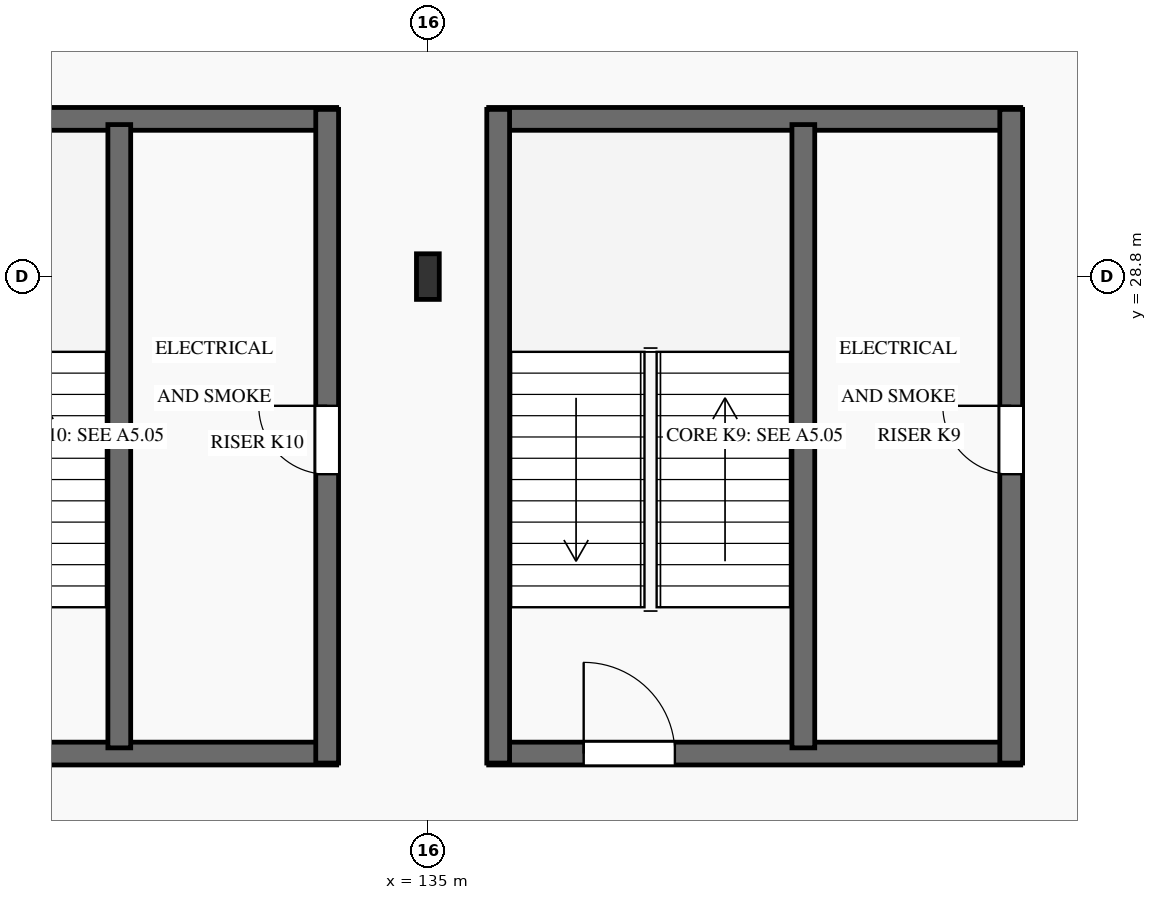
"""IFC4 building model, lengths in metres.
Left out: names, types, materials, properties, quantities, classifications, styles, units other than length and angle.
Written with IfcOpenShell. Run it as: python <this file> out.ifc"""

import sys

from ifc_helpers import new_model, si_unit, direction, frame, frame_2d, origin, origin_2d, place, context, subcontext, project, spatial, rectangle, i_section, extrude, element, fill, save


model = new_model("IFC4")
c1 = context("Model", 3, precision=1e-05, world=origin(), true_north=direction((0.0, 1.0)))
c2 = subcontext(c1, "Body", "Model", "MODEL_VIEW")
j1 = project(units=[si_unit("LENGTHUNIT", "METRE"), si_unit("PLANEANGLEUNIT", "RADIAN")], contexts=[c1])
p1 = place(None, origin())
s1 = spatial("IfcSite", under=j1, at=p1, CompositionType="ELEMENT")
p2 = place(p1, origin())
s2 = spatial("IfcBuilding", under=s1, at=p2, CompositionType="ELEMENT")
p3 = place(p2, frame((0.0, 0.0, -4.5)))
s3 = spatial("IfcBuildingStorey", under=s2, at=p3, CompositionType="ELEMENT", Elevation=-4.5)
p4 = place(p3, frame((135.0, 28.8, 0.0), z_axis=(0.0, 0.0, 1.0), x_axis=(1.0, 0.0, 0.0)))
e1 = element("IfcColumn", 1, at=p4, inside=s3, PredefinedType="COLUMN", context=c2, shape_type="SweptSolid", body=[
    extrude(i_section(OverallWidth=0.3, OverallDepth=0.6, WebThickness=0.015, FlangeThickness=0.03, FilletRadius=0.027, at=origin_2d()), origin(), (0.0, 0.0, 1.0), 4.5),
])
p5 = place(p3, frame((135.8, 22.525, 0.0), z_axis=(0.0, 0.0, 1.0), x_axis=(1.0, 0.0, 0.0)))
e2 = element("IfcWall", 2, at=p5, inside=s3, PredefinedType="SHEAR", context=c2, shape_type="SweptSolid", body=[
    extrude(rectangle(XDim=7.0, YDim=0.3, at=frame_2d((3.5, 0.0))), origin(), (0.0, 0.0, 1.0), 4.5),
])
p6 = place(p5, frame((1.25, 0.0, 0.0)))
e3 = element("IfcOpeningElement", 3, at=p6, cuts=e2, PredefinedType="OPENING", context=c2, shape_type="SweptSolid", body=[
    extrude(rectangle(XDim=1.2, YDim=2.15, at=frame_2d((0.6, 1.075))), frame((0.0, 0.165, 0.0), z_axis=(0.0, -1.0, 0.0), x_axis=(1.0, 0.0, 0.0)), (0.0, 0.0, 1.0), 0.33),
])
p7 = place(p3, frame((135.8, 30.875, 0.0), z_axis=(0.0, 0.0, 1.0), x_axis=(1.0, 0.0, 0.0)))
e4 = element("IfcWall", 4, at=p7, inside=s3, PredefinedType="SHEAR", context=c2, shape_type="SweptSolid", body=[
    extrude(rectangle(XDim=7.0, YDim=0.3, at=frame_2d((3.5, 0.0))), origin(), (0.0, 0.0, 1.0), 4.5),
])
p8 = place(p3, frame((135.925, 22.4, 0.0), z_axis=(0.0, 0.0, 1.0), x_axis=(0.0, 1.0, 0.0)))
e5 = element("IfcWall", 5, at=p8, inside=s3, PredefinedType="SHEAR", context=c2, shape_type="SweptSolid", body=[
    extrude(rectangle(XDim=8.6, YDim=0.3, at=frame_2d((4.3, 0.0))), origin(), (0.0, 0.0, 1.0), 4.5),
])
p9 = place(p3, frame((142.675, 22.4, 0.0), z_axis=(0.0, 0.0, 1.0), x_axis=(0.0, 1.0, 0.0)))
e6 = element("IfcWall", 6, at=p9, inside=s3, PredefinedType="SHEAR", context=c2, shape_type="SweptSolid", body=[
    extrude(rectangle(XDim=8.6, YDim=0.3, at=frame_2d((4.3, 0.0))), origin(), (0.0, 0.0, 1.0), 4.5),
])
p10 = place(p9, frame((3.8, 0.0, 0.0)))
e7 = element("IfcOpeningElement", 7, at=p10, cuts=e6, PredefinedType="OPENING", context=c2, shape_type="SweptSolid", body=[
    extrude(rectangle(XDim=0.9, YDim=2.05, at=frame_2d((0.45, 1.025))), frame((0.0, 0.165, 0.0), z_axis=(0.0, -1.0, 0.0), x_axis=(1.0, 0.0, 0.0)), (0.0, 0.0, 1.0), 0.33),
])
p11 = place(p3, frame((139.94, 22.6, 0.0), z_axis=(0.0, 0.0, 1.0), x_axis=(0.0, 1.0, 0.0)))
e8 = element("IfcWall", 8, at=p11, inside=s3, PredefinedType="SHEAR", context=c2, shape_type="SweptSolid", body=[
    extrude(rectangle(XDim=8.2, YDim=0.3, at=frame_2d((4.1, 0.0))), origin(), (0.0, 0.0, 1.0), 4.5),
])
p12 = place(p3, frame((126.8, 22.525, 0.0), z_axis=(0.0, 0.0, 1.0), x_axis=(1.0, 0.0, 0.0)))
e9 = element("IfcWall", 9, at=p12, inside=s3, PredefinedType="SHEAR", context=c2, shape_type="SweptSolid", body=[
    extrude(rectangle(XDim=7.0, YDim=0.3, at=frame_2d((3.5, 0.0))), origin(), (0.0, 0.0, 1.0), 4.5),
])
p13 = place(p12, frame((1.25, 0.0, 0.0)))
e10 = element("IfcOpeningElement", 10, at=p13, cuts=e9, PredefinedType="OPENING", context=c2, shape_type="SweptSolid", body=[
    extrude(rectangle(XDim=1.2, YDim=2.15, at=frame_2d((0.6, 1.075))), frame((0.0, 0.165, 0.0), z_axis=(0.0, -1.0, 0.0), x_axis=(1.0, 0.0, 0.0)), (0.0, 0.0, 1.0), 0.33),
])
p14 = place(p3, frame((126.8, 30.875, 0.0), z_axis=(0.0, 0.0, 1.0), x_axis=(1.0, 0.0, 0.0)))
e11 = element("IfcWall", 11, at=p14, inside=s3, PredefinedType="SHEAR", context=c2, shape_type="SweptSolid", body=[
    extrude(rectangle(XDim=7.0, YDim=0.3, at=frame_2d((3.5, 0.0))), origin(), (0.0, 0.0, 1.0), 4.5),
])
p15 = place(p3, frame((133.675, 22.4, 0.0), z_axis=(0.0, 0.0, 1.0), x_axis=(0.0, 1.0, 0.0)))
e12 = element("IfcWall", 12, at=p15, inside=s3, PredefinedType="SHEAR", context=c2, shape_type="SweptSolid", body=[
    extrude(rectangle(XDim=8.6, YDim=0.3, at=frame_2d((4.3, 0.0))), origin(), (0.0, 0.0, 1.0), 4.5),
])
p16 = place(p15, frame((3.8, 0.0, 0.0)))
e13 = element("IfcOpeningElement", 13, at=p16, cuts=e12, PredefinedType="OPENING", context=c2, shape_type="SweptSolid", body=[
    extrude(rectangle(XDim=0.9, YDim=2.05, at=frame_2d((0.45, 1.025))), frame((0.0, 0.165, 0.0), z_axis=(0.0, -1.0, 0.0), x_axis=(1.0, 0.0, 0.0)), (0.0, 0.0, 1.0), 0.33),
])
p17 = place(p3, frame((130.94, 22.6, 0.0), z_axis=(0.0, 0.0, 1.0), x_axis=(0.0, 1.0, 0.0)))
e14 = element("IfcWall", 14, at=p17, inside=s3, PredefinedType="SHEAR", context=c2, shape_type="SweptSolid", body=[
    extrude(rectangle(XDim=8.2, YDim=0.3, at=frame_2d((4.1, 0.0))), origin(), (0.0, 0.0, 1.0), 4.5),
])
p18 = place(p6, origin())
e15 = element("IfcDoor", 15, at=p18, inside=s3, OperationType="SINGLE_SWING_LEFT", PredefinedType="DOOR", context=c2, shape_type="SweptSolid", body=[
    extrude(rectangle(XDim=1.2, YDim=2.15, at=frame_2d((0.6, 1.075))), frame((0.0, 0.025, 0.0), z_axis=(0.0, -1.0, 0.0), x_axis=(1.0, 0.0, 0.0)), (0.0, 0.0, 1.0), 0.05),
])
fill(e3, e15)
p19 = place(p10, origin())
e16 = element("IfcDoor", 16, at=p19, inside=s3, OperationType="SINGLE_SWING_RIGHT", PredefinedType="DOOR", context=c2, shape_type="SweptSolid", body=[
    extrude(rectangle(XDim=0.9, YDim=2.05, at=frame_2d((0.45, 1.025))), frame((0.0, 0.025, 0.0), z_axis=(0.0, -1.0, 0.0), x_axis=(1.0, 0.0, 0.0)), (0.0, 0.0, 1.0), 0.05),
])
fill(e7, e16)
p20 = place(p16, origin())
e17 = element("IfcDoor", 17, at=p20, inside=s3, OperationType="SINGLE_SWING_RIGHT", PredefinedType="DOOR", context=c2, shape_type="SweptSolid", body=[
    extrude(rectangle(XDim=0.9, YDim=2.05, at=frame_2d((0.45, 1.025))), frame((0.0, 0.025, 0.0), z_axis=(0.0, -1.0, 0.0), x_axis=(1.0, 0.0, 0.0)), (0.0, 0.0, 1.0), 0.05),
])
fill(e13, e17)
save(model, sys.argv[1])
